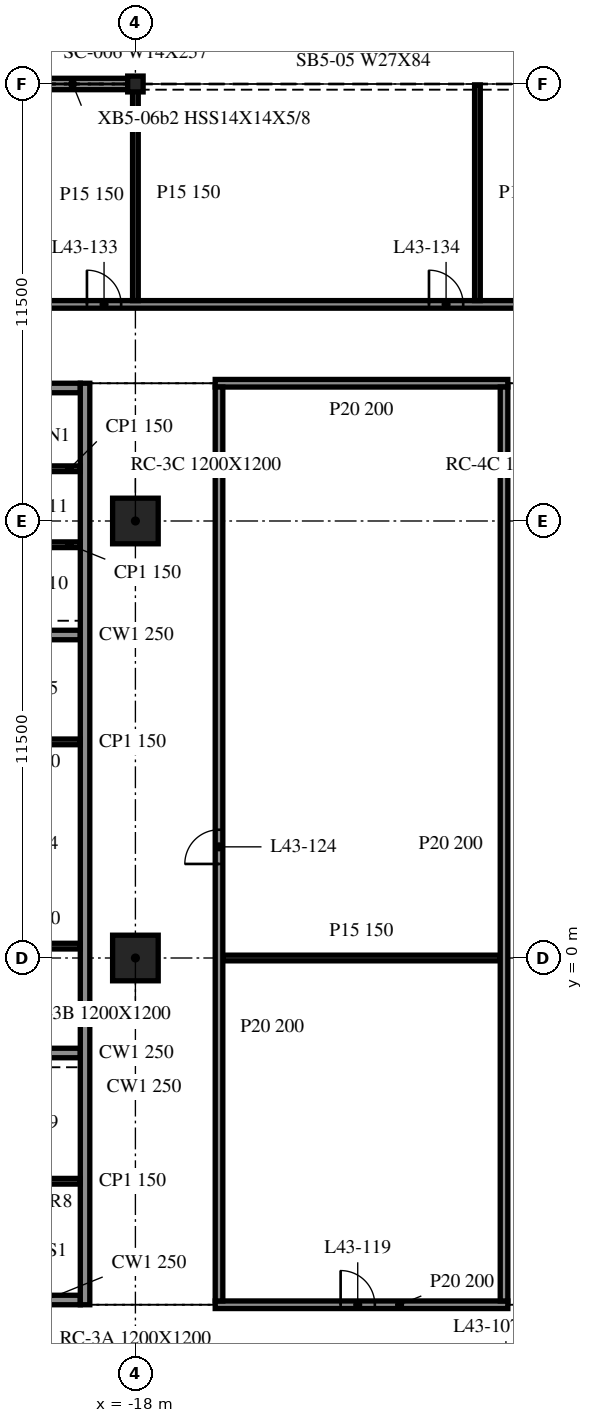
"""IFC4 building model, lengths in metres.
Left out: names, types, materials, properties, quantities, classifications, styles, units other than length and angle.
Written with IfcOpenShell. Run it as: python <this file> out.ifc"""

import sys

from ifc_helpers import new_model, si_unit, direction, frame, frame_2d, origin, origin_2d, place, context, subcontext, project, spatial, rectangle, i_section, extrude, element, fill, save


model = new_model("IFC4")
c1 = context("Model", 3, precision=1e-05, world=origin(), true_north=direction((0.0, 1.0)))
c2 = subcontext(c1, "Body", "Model", "MODEL_VIEW")
j1 = project(units=[si_unit("LENGTHUNIT", "METRE"), si_unit("PLANEANGLEUNIT", "RADIAN")], contexts=[c1])
p1 = place(None, origin())
s1 = spatial("IfcSite", under=j1, at=p1, CompositionType="ELEMENT")
p2 = place(p1, origin())
s2 = spatial("IfcBuilding", under=s1, at=p2, CompositionType="ELEMENT")
p3 = place(p2, frame((0.0, 0.0, 182.0)))
s3 = spatial("IfcBuildingStorey", under=s2, at=p3, CompositionType="ELEMENT", Elevation=182.0)
for number, where, z_axis, x_axis in (
    (1, (-18.0, 0.0, -0.34), (0.0, 0.0, 1.0), (1.0, 0.0, 0.0)),
    (2, (-18.0, 11.5, -0.34), (0.0, 0.0, 1.0), (1.0, 0.0, 0.0)),
):
    element("IfcColumn", number, at=place(p3, frame(where, z_axis=z_axis, x_axis=x_axis)), inside=s3, PredefinedType="COLUMN", context=c2, shape_type="SweptSolid", body=[
        extrude(rectangle(XDim=1.2, YDim=1.2, at=origin_2d()), origin(), (0.0, 0.0, 1.0), 3.8),
    ])
p4 = place(p3, frame((-18.0, 23.0, -0.34), z_axis=(0.0, 0.0, 1.0), x_axis=(1.0, 0.0, 0.0)))
e3 = element("IfcColumn", 3, at=p4, inside=s3, PredefinedType="COLUMN", context=c2, shape_type="SweptSolid", body=[
    extrude(i_section(OverallWidth=0.406, OverallDepth=0.417, WebThickness=0.03, FlangeThickness=0.048, at=origin_2d()), origin(), (0.0, 0.0, 1.0), 3.8),
])
p5 = place(p3, frame((-18.015, 23.0, 0.0), z_axis=(0.0, 0.0, 1.0), x_axis=(-1.0, 0.0, 0.0)))
e4 = element("IfcWall", 4, at=p5, inside=s3, PredefinedType="NOTDEFINED", context=c2, shape_type="SweptSolid", body=[
    extrude(rectangle(XDim=11.97, YDim=0.3, at=frame_2d((5.985, 0.0))), origin(), (0.0, 0.0, 1.0), 2.782),
])
p6 = place(p3, frame((-19.325, -9.125, 0.0), z_axis=(0.0, 0.0, 1.0), x_axis=(0.0, 1.0, 0.0)))
e5 = element("IfcWall", 5, at=p6, inside=s3, PredefinedType="SOLIDWALL", context=c2, shape_type="SweptSolid", body=[
    extrude(rectangle(XDim=24.25, YDim=0.25, at=frame_2d((12.125, 0.0))), origin(), (0.0, 0.0, 1.0), 3.46),
])
p7 = place(p3, frame((-19.45, -9.0, 0.0), z_axis=(0.0, 0.0, 1.0), x_axis=(-1.0, 0.0, 0.0)))
e6 = element("IfcWall", 6, at=p7, inside=s3, PredefinedType="SOLIDWALL", context=c2, shape_type="SweptSolid", body=[
    extrude(rectangle(XDim=9.1, YDim=0.25, at=frame_2d((4.55, 0.0))), origin(), (0.0, 0.0, 1.0), 3.46),
])
p8 = place(p7, frame((3.65, 0.0, 0.0)))
e7 = element("IfcOpeningElement", 7, at=p8, cuts=e6, PredefinedType="OPENING", context=c2, shape_type="SweptSolid", body=[
    extrude(rectangle(XDim=1.8, YDim=2.1, at=frame_2d((0.9, 1.05))), frame((0.0, 0.135, 0.0), z_axis=(0.0, -1.0, 0.0), x_axis=(1.0, 0.0, 0.0)), (0.0, 0.0, 1.0), 0.27),
])
p9 = place(p3, frame((-28.55, 15.0, 0.0), z_axis=(0.0, 0.0, 1.0), x_axis=(1.0, 0.0, 0.0)))
e8 = element("IfcWall", 8, at=p9, inside=s3, PredefinedType="SOLIDWALL", context=c2, shape_type="SweptSolid", body=[
    extrude(rectangle(XDim=9.1, YDim=0.25, at=frame_2d((4.55, 0.0))), origin(), (0.0, 0.0, 1.0), 3.46),
])
p10 = place(p9, frame((3.65, 0.0, 0.0)))
e9 = element("IfcOpeningElement", 9, at=p10, cuts=e8, PredefinedType="OPENING", context=c2, shape_type="SweptSolid", body=[
    extrude(rectangle(XDim=1.8, YDim=2.1, at=frame_2d((0.9, 1.05))), frame((0.0, 0.135, 0.0), z_axis=(0.0, -1.0, 0.0), x_axis=(1.0, 0.0, 0.0)), (0.0, 0.0, 1.0), 0.27),
])
for number, where, z_axis, x_axis in (
    (10, (-22.3, -2.5, 0.0), (0.0, 0.0, 1.0), (1.0, 0.0, 0.0)),
    (11, (-22.3, 8.5, 0.0), (0.0, 0.0, 1.0), (1.0, 0.0, 0.0)),
):
    element("IfcWall", number, at=place(p3, frame(where, z_axis=z_axis, x_axis=x_axis)), inside=s3, PredefinedType="SOLIDWALL", context=c2, shape_type="SweptSolid", body=[
        extrude(rectangle(XDim=2.85, YDim=0.25, at=frame_2d((1.425, 0.0))), origin(), (0.0, 0.0, 1.0), 3.46),
    ])
for number, where, z_axis, x_axis in (
    (12, (-22.3, 0.312, 0.0), (0.0, 0.0, 1.0), (1.0, 0.0, 0.0)),
    (13, (-22.3, 5.688, 0.0), (0.0, 0.0, 1.0), (1.0, 0.0, 0.0)),
    (14, (-22.3, -5.875, 0.0), (0.0, 0.0, 1.0), (1.0, 0.0, 0.0)),
    (15, (-22.3, 10.875, 0.0), (0.0, 0.0, 1.0), (1.0, 0.0, 0.0)),
    (16, (-22.3, 12.875, 0.0), (0.0, 0.0, 1.0), (1.0, 0.0, 0.0)),
):
    element("IfcWall", number, at=place(p3, frame(where, z_axis=z_axis, x_axis=x_axis)), inside=s3, PredefinedType="PARTITIONING", context=c2, shape_type="SweptSolid", body=[
        extrude(rectangle(XDim=2.85, YDim=0.15, at=frame_2d((1.425, 0.0))), origin(), (0.0, 0.0, 1.0), 3.46),
    ])
p11 = place(p3, frame((-15.9, -9.125, 0.0), z_axis=(0.0, 0.0, 1.0), x_axis=(1.0, 0.0, 0.0)))
e17 = element("IfcWall", 17, at=p11, inside=s3, PredefinedType="PARTITIONING", context=c2, shape_type="SweptSolid", body=[
    extrude(rectangle(XDim=7.7, YDim=0.2, at=frame_2d((3.85, 0.0))), origin(), (0.0, 0.0, 1.0), 3.46),
])
p12 = place(p11, frame((3.3, 0.0, 0.0)))
e18 = element("IfcOpeningElement", 18, at=p12, cuts=e17, PredefinedType="OPENING", context=c2, shape_type="SweptSolid", body=[
    extrude(rectangle(XDim=0.9, YDim=2.1, at=frame_2d((0.45, 1.05))), frame((0.0, 0.11, 0.0), z_axis=(0.0, -1.0, 0.0), x_axis=(1.0, 0.0, 0.0)), (0.0, 0.0, 1.0), 0.22),
])
p13 = place(p3, frame((-15.7, 0.0, 0.0), z_axis=(0.0, 0.0, 1.0), x_axis=(1.0, 0.0, 0.0)))
e19 = element("IfcWall", 19, at=p13, inside=s3, PredefinedType="PARTITIONING", context=c2, shape_type="SweptSolid", body=[
    extrude(rectangle(XDim=7.3, YDim=0.15, at=frame_2d((3.65, 0.0))), origin(), (0.0, 0.0, 1.0), 3.46),
])
p14 = place(p3, frame((-15.9, 15.125, 0.0), z_axis=(0.0, 0.0, 1.0), x_axis=(1.0, 0.0, 0.0)))
e20 = element("IfcWall", 20, at=p14, inside=s3, PredefinedType="PARTITIONING", context=c2, shape_type="SweptSolid", body=[
    extrude(rectangle(XDim=7.7, YDim=0.2, at=frame_2d((3.85, 0.0))), origin(), (0.0, 0.0, 1.0), 3.46),
])
p15 = place(p3, frame((-47.975, 17.2, 0.0), z_axis=(0.0, 0.0, 1.0), x_axis=(1.0, 0.0, 0.0)))
e21 = element("IfcWall", 21, at=p15, inside=s3, PredefinedType="PARTITIONING", context=c2, shape_type="SweptSolid", body=[
    extrude(rectangle(XDim=95.95, YDim=0.2, at=frame_2d((47.975, 0.0))), origin(), (0.0, 0.0, 1.0), 3.46),
])
p16 = place(p15, frame((7.7, 0.0, 0.0)))
e22 = element("IfcOpeningElement", 22, at=p16, cuts=e21, PredefinedType="OPENING", context=c2, shape_type="SweptSolid", body=[
    extrude(rectangle(XDim=0.9, YDim=2.1, at=frame_2d((0.45, 1.05))), frame((0.0, 0.11, 0.0), z_axis=(0.0, -1.0, 0.0), x_axis=(1.0, 0.0, 0.0)), (0.0, 0.0, 1.0), 0.22),
])
p17 = place(p15, frame((16.7, 0.0, 0.0)))
e23 = element("IfcOpeningElement", 23, at=p17, cuts=e21, PredefinedType="OPENING", context=c2, shape_type="SweptSolid", body=[
    extrude(rectangle(XDim=0.9, YDim=2.1, at=frame_2d((0.45, 1.05))), frame((0.0, 0.11, 0.0), z_axis=(0.0, -1.0, 0.0), x_axis=(1.0, 0.0, 0.0)), (0.0, 0.0, 1.0), 0.22),
])
p18 = place(p15, frame((22.7, 0.0, 0.0)))
e24 = element("IfcOpeningElement", 24, at=p18, cuts=e21, PredefinedType="OPENING", context=c2, shape_type="SweptSolid", body=[
    extrude(rectangle(XDim=0.9, YDim=2.1, at=frame_2d((0.45, 1.05))), frame((0.0, 0.11, 0.0), z_axis=(0.0, -1.0, 0.0), x_axis=(1.0, 0.0, 0.0)), (0.0, 0.0, 1.0), 0.22),
])
p19 = place(p15, frame((26.1, 0.0, 0.0)))
e25 = element("IfcOpeningElement", 25, at=p19, cuts=e21, PredefinedType="OPENING", context=c2, shape_type="SweptSolid", body=[
    extrude(rectangle(XDim=0.9, YDim=2.1, at=frame_2d((0.45, 1.05))), frame((0.0, 0.11, 0.0), z_axis=(0.0, -1.0, 0.0), x_axis=(1.0, 0.0, 0.0)), (0.0, 0.0, 1.0), 0.22),
])
p20 = place(p15, frame((28.7, 0.0, 0.0)))
e26 = element("IfcOpeningElement", 26, at=p20, cuts=e21, PredefinedType="OPENING", context=c2, shape_type="SweptSolid", body=[
    extrude(rectangle(XDim=0.9, YDim=2.1, at=frame_2d((0.45, 1.05))), frame((0.0, 0.11, 0.0), z_axis=(0.0, -1.0, 0.0), x_axis=(1.0, 0.0, 0.0)), (0.0, 0.0, 1.0), 0.22),
])
p21 = place(p15, frame((37.7, 0.0, 0.0)))
e27 = element("IfcOpeningElement", 27, at=p21, cuts=e21, PredefinedType="OPENING", context=c2, shape_type="SweptSolid", body=[
    extrude(rectangle(XDim=0.9, YDim=2.1, at=frame_2d((0.45, 1.05))), frame((0.0, 0.11, 0.0), z_axis=(0.0, -1.0, 0.0), x_axis=(1.0, 0.0, 0.0)), (0.0, 0.0, 1.0), 0.22),
])
p22 = place(p15, frame((46.7, 0.0, 0.0)))
e28 = element("IfcOpeningElement", 28, at=p22, cuts=e21, PredefinedType="OPENING", context=c2, shape_type="SweptSolid", body=[
    extrude(rectangle(XDim=0.9, YDim=2.1, at=frame_2d((0.45, 1.05))), frame((0.0, 0.11, 0.0), z_axis=(0.0, -1.0, 0.0), x_axis=(1.0, 0.0, 0.0)), (0.0, 0.0, 1.0), 0.22),
])
p23 = place(p15, frame((48.1, 0.0, 0.0)))
e29 = element("IfcOpeningElement", 29, at=p23, cuts=e21, PredefinedType="OPENING", context=c2, shape_type="SweptSolid", body=[
    extrude(rectangle(XDim=0.9, YDim=2.1, at=frame_2d((0.45, 1.05))), frame((0.0, 0.11, 0.0), z_axis=(0.0, -1.0, 0.0), x_axis=(1.0, 0.0, 0.0)), (0.0, 0.0, 1.0), 0.22),
])
p24 = place(p15, frame((54.1, 0.0, 0.0)))
e30 = element("IfcOpeningElement", 30, at=p24, cuts=e21, PredefinedType="OPENING", context=c2, shape_type="SweptSolid", body=[
    extrude(rectangle(XDim=0.9, YDim=2.1, at=frame_2d((0.45, 1.05))), frame((0.0, 0.11, 0.0), z_axis=(0.0, -1.0, 0.0), x_axis=(1.0, 0.0, 0.0)), (0.0, 0.0, 1.0), 0.22),
])
p25 = place(p15, frame((57.5, 0.0, 0.0)))
e31 = element("IfcOpeningElement", 31, at=p25, cuts=e21, PredefinedType="OPENING", context=c2, shape_type="SweptSolid", body=[
    extrude(rectangle(XDim=0.9, YDim=2.1, at=frame_2d((0.45, 1.05))), frame((0.0, 0.11, 0.0), z_axis=(0.0, -1.0, 0.0), x_axis=(1.0, 0.0, 0.0)), (0.0, 0.0, 1.0), 0.22),
])
p26 = place(p15, frame((60.1, 0.0, 0.0)))
e32 = element("IfcOpeningElement", 32, at=p26, cuts=e21, PredefinedType="OPENING", context=c2, shape_type="SweptSolid", body=[
    extrude(rectangle(XDim=0.9, YDim=2.1, at=frame_2d((0.45, 1.05))), frame((0.0, 0.11, 0.0), z_axis=(0.0, -1.0, 0.0), x_axis=(1.0, 0.0, 0.0)), (0.0, 0.0, 1.0), 0.22),
])
p27 = place(p15, frame((69.1, 0.0, 0.0)))
e33 = element("IfcOpeningElement", 33, at=p27, cuts=e21, PredefinedType="OPENING", context=c2, shape_type="SweptSolid", body=[
    extrude(rectangle(XDim=0.9, YDim=2.1, at=frame_2d((0.45, 1.05))), frame((0.0, 0.11, 0.0), z_axis=(0.0, -1.0, 0.0), x_axis=(1.0, 0.0, 0.0)), (0.0, 0.0, 1.0), 0.22),
])
p28 = place(p15, frame((78.1, 0.0, 0.0)))
e34 = element("IfcOpeningElement", 34, at=p28, cuts=e21, PredefinedType="OPENING", context=c2, shape_type="SweptSolid", body=[
    extrude(rectangle(XDim=0.9, YDim=2.1, at=frame_2d((0.45, 1.05))), frame((0.0, 0.11, 0.0), z_axis=(0.0, -1.0, 0.0), x_axis=(1.0, 0.0, 0.0)), (0.0, 0.0, 1.0), 0.22),
])
p29 = place(p15, frame((84.1, 0.0, 0.0)))
e35 = element("IfcOpeningElement", 35, at=p29, cuts=e21, PredefinedType="OPENING", context=c2, shape_type="SweptSolid", body=[
    extrude(rectangle(XDim=0.9, YDim=2.1, at=frame_2d((0.45, 1.05))), frame((0.0, 0.11, 0.0), z_axis=(0.0, -1.0, 0.0), x_axis=(1.0, 0.0, 0.0)), (0.0, 0.0, 1.0), 0.22),
])
p30 = place(p15, frame((87.5, 0.0, 0.0)))
e36 = element("IfcOpeningElement", 36, at=p30, cuts=e21, PredefinedType="OPENING", context=c2, shape_type="SweptSolid", body=[
    extrude(rectangle(XDim=0.9, YDim=2.1, at=frame_2d((0.45, 1.05))), frame((0.0, 0.11, 0.0), z_axis=(0.0, -1.0, 0.0), x_axis=(1.0, 0.0, 0.0)), (0.0, 0.0, 1.0), 0.22),
])
p31 = place(p15, frame((90.1, 0.0, 0.0)))
e37 = element("IfcOpeningElement", 37, at=p31, cuts=e21, PredefinedType="OPENING", context=c2, shape_type="SweptSolid", body=[
    extrude(rectangle(XDim=0.9, YDim=2.1, at=frame_2d((0.45, 1.05))), frame((0.0, 0.11, 0.0), z_axis=(0.0, -1.0, 0.0), x_axis=(1.0, 0.0, 0.0)), (0.0, 0.0, 1.0), 0.22),
])
p32 = place(p3, frame((-18.0, 17.3, 0.0), z_axis=(0.0, 0.0, 1.0), x_axis=(0.0, 1.0, 0.0)))
e38 = element("IfcWall", 38, at=p32, inside=s3, PredefinedType="PARTITIONING", context=c2, shape_type="SweptSolid", body=[
    extrude(rectangle(XDim=5.675, YDim=0.15, at=frame_2d((2.837, 0.0))), origin(), (0.0, 0.0, 1.0), 3.46),
])
p33 = place(p3, frame((-15.8, -9.025, 0.0), z_axis=(0.0, 0.0, 1.0), x_axis=(0.0, 1.0, 0.0)))
e39 = element("IfcWall", 39, at=p33, inside=s3, PredefinedType="PARTITIONING", context=c2, shape_type="SweptSolid", body=[
    extrude(rectangle(XDim=24.05, YDim=0.2, at=frame_2d((12.025, 0.0))), origin(), (0.0, 0.0, 1.0), 3.46),
])
p34 = place(p33, frame((11.5, 0.0, 0.0)))
e40 = element("IfcOpeningElement", 40, at=p34, cuts=e39, PredefinedType="OPENING", context=c2, shape_type="SweptSolid", body=[
    extrude(rectangle(XDim=0.9, YDim=2.1, at=frame_2d((0.45, 1.05))), frame((0.0, 0.11, 0.0), z_axis=(0.0, -1.0, 0.0), x_axis=(1.0, 0.0, 0.0)), (0.0, 0.0, 1.0), 0.22),
])
p35 = place(p3, frame((-9.0, 17.3, 0.0), z_axis=(0.0, 0.0, 1.0), x_axis=(0.0, 1.0, 0.0)))
e41 = element("IfcWall", 41, at=p35, inside=s3, PredefinedType="PARTITIONING", context=c2, shape_type="SweptSolid", body=[
    extrude(rectangle(XDim=5.675, YDim=0.15, at=frame_2d((2.837, 0.0))), origin(), (0.0, 0.0, 1.0), 3.46),
])
p36 = place(p3, frame((-8.3, -9.025, 0.0), z_axis=(0.0, 0.0, 1.0), x_axis=(0.0, 1.0, 0.0)))
e42 = element("IfcWall", 42, at=p36, inside=s3, PredefinedType="PARTITIONING", context=c2, shape_type="SweptSolid", body=[
    extrude(rectangle(XDim=24.05, YDim=0.2, at=frame_2d((12.025, 0.0))), origin(), (0.0, 0.0, 1.0), 3.46),
])
p37 = place(p12, origin())
e43 = element("IfcDoor", 43, at=p37, inside=s3, OperationType="SINGLE_SWING_LEFT", PredefinedType="DOOR", context=c2, shape_type="SweptSolid", body=[
    extrude(rectangle(XDim=0.9, YDim=2.1, at=frame_2d((0.45, 1.05))), frame((0.0, 0.025, 0.0), z_axis=(0.0, -1.0, 0.0), x_axis=(1.0, 0.0, 0.0)), (0.0, 0.0, 1.0), 0.05),
])
fill(e18, e43)
p38 = place(p34, origin())
e44 = element("IfcDoor", 44, at=p38, inside=s3, OperationType="SINGLE_SWING_RIGHT", PredefinedType="DOOR", context=c2, shape_type="SweptSolid", body=[
    extrude(rectangle(XDim=0.9, YDim=2.1, at=frame_2d((0.45, 1.05))), frame((0.0, 0.025, 0.0), z_axis=(0.0, -1.0, 0.0), x_axis=(1.0, 0.0, 0.0)), (0.0, 0.0, 1.0), 0.05),
])
fill(e40, e44)
p39 = place(p20, origin())
e45 = element("IfcDoor", 45, at=p39, inside=s3, OperationType="SINGLE_SWING_LEFT", PredefinedType="DOOR", context=c2, shape_type="SweptSolid", body=[
    extrude(rectangle(XDim=0.9, YDim=2.1, at=frame_2d((0.45, 1.05))), frame((0.0, 0.025, 0.0), z_axis=(0.0, -1.0, 0.0), x_axis=(1.0, 0.0, 0.0)), (0.0, 0.0, 1.0), 0.05),
])
fill(e26, e45)
p40 = place(p21, origin())
e46 = element("IfcDoor", 46, at=p40, inside=s3, OperationType="SINGLE_SWING_LEFT", PredefinedType="DOOR", context=c2, shape_type="SweptSolid", body=[
    extrude(rectangle(XDim=0.9, YDim=2.1, at=frame_2d((0.45, 1.05))), frame((0.0, 0.025, 0.0), z_axis=(0.0, -1.0, 0.0), x_axis=(1.0, 0.0, 0.0)), (0.0, 0.0, 1.0), 0.05),
])
fill(e27, e46)
save(model, sys.argv[1])
